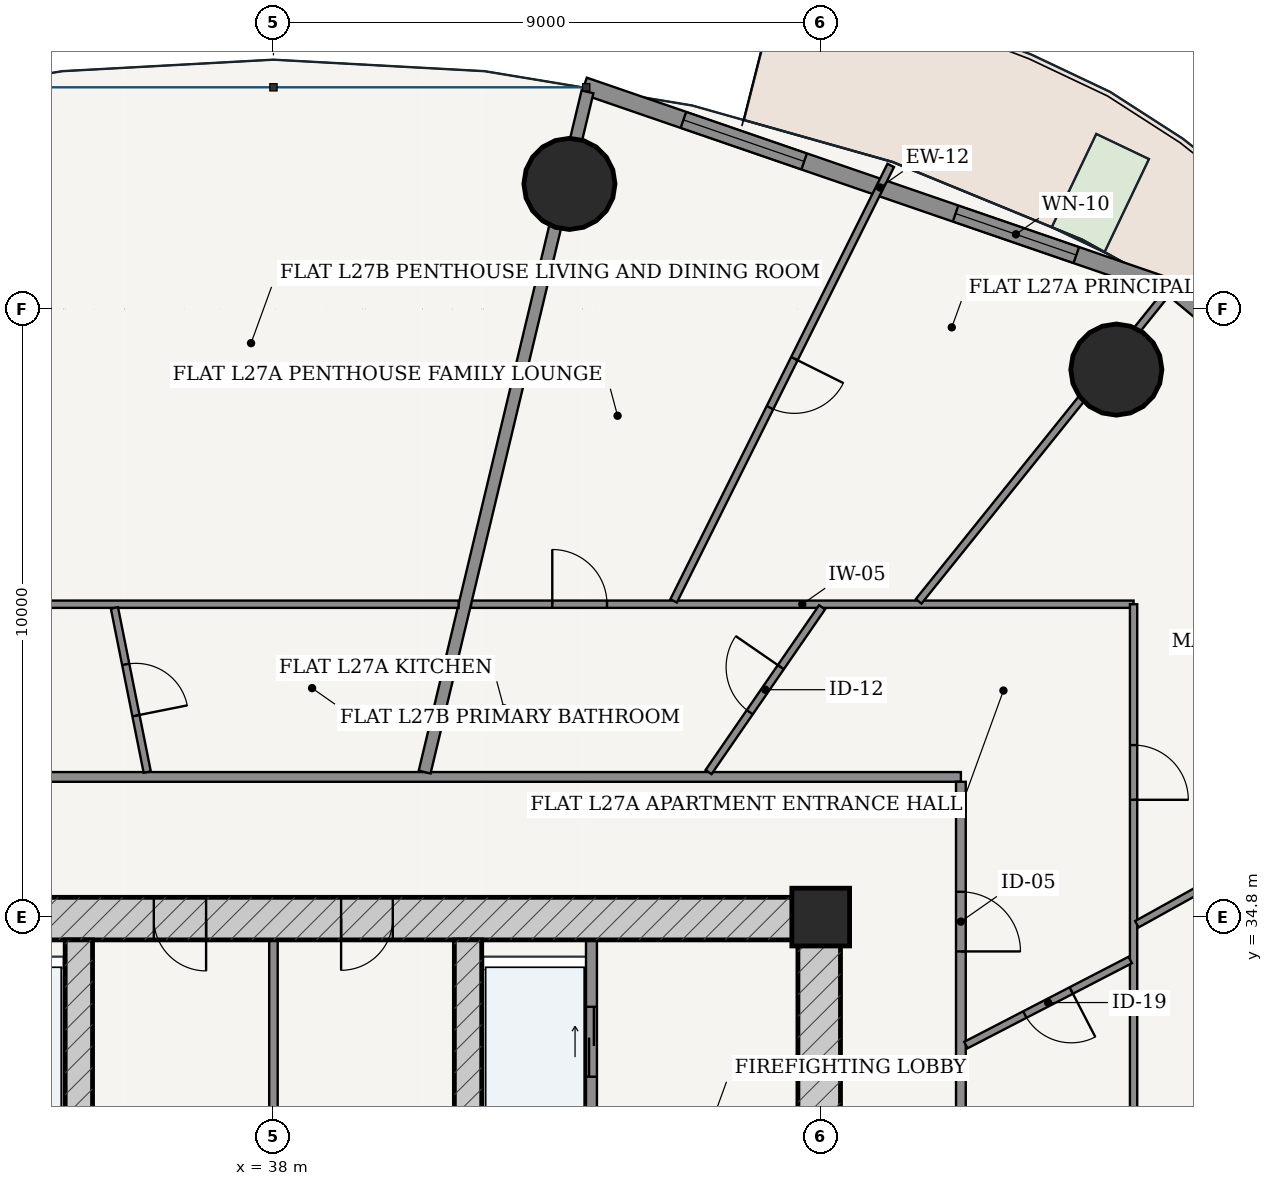
"""IFC4 building model, lengths in metres.
Left out: names, types, materials, properties, quantities, classifications, styles, units other than length and angle.
Written with IfcOpenShell. Run it as: python <this file> out.ifc"""

import sys

from ifc_helpers import new_model, si_unit, direction, frame, frame_2d, origin, origin_2d, place, context, subcontext, project, spatial, rectangle, hollow_circle, extrude, source, transform, mapped, element, fill, save


model = new_model("IFC4")
c1 = context("Model", 3, precision=1e-05, world=origin(), true_north=direction((-0.2419218956, 0.970295726276)))
c2 = subcontext(c1, "Body", "Model", "MODEL_VIEW")
j1 = project(units=[si_unit("LENGTHUNIT", "METRE"), si_unit("PLANEANGLEUNIT", "RADIAN")], contexts=[c1])
p1 = place(None, origin())
s1 = spatial("IfcSite", under=j1, at=p1, CompositionType="ELEMENT")
p2 = place(p1, origin())
s2 = spatial("IfcBuilding", under=s1, at=p2, CompositionType="ELEMENT")
p3 = place(p2, frame((0.0, 0.0, 105.0)))
s3 = spatial("IfcBuildingStorey", under=s2, at=p3, CompositionType="ELEMENT", Elevation=105.0)
p4 = place(p3, frame((47.0, 34.8, 0.0), z_axis=(0.0, 0.0, 1.0), x_axis=(1.0, 0.0, 0.0)))
e1 = element("IfcColumn", 1, at=p4, inside=s3, PredefinedType="COLUMN", context=c2, shape_type="SweptSolid", body=[
    extrude(rectangle(XDim=0.95, YDim=0.95, at=origin_2d()), origin(), (0.0, 0.0, 1.0), 3.6),
])
p5 = place(p3, frame((28.675, 34.775, 0.0), z_axis=(0.0, 0.0, 1.0), x_axis=(1.0, 0.0, 0.0)))
e2 = element("IfcWall", 2, at=p5, inside=s3, PredefinedType="SHEAR", context=c2, shape_type="SweptSolid", body=[
    extrude(rectangle(XDim=18.65, YDim=0.7, at=frame_2d((9.325, 0.0))), origin(), (0.0, 0.0, 1.0), 3.325),
])
p6 = place(p5, frame((7.357, 0.0, 0.0)))
e3 = element("IfcOpeningElement", 3, at=p6, cuts=e2, PredefinedType="OPENING", context=c2, shape_type="SweptSolid", body=[
    extrude(rectangle(XDim=0.86, YDim=2.1, at=frame_2d((0.43, 1.05))), frame((0.0, 0.36, 0.0), z_axis=(0.0, -1.0, 0.0), x_axis=(1.0, 0.0, 0.0)), (0.0, 0.0, 1.0), 0.72),
])
p7 = place(p5, frame((10.438, 0.0, 0.0)))
e4 = element("IfcOpeningElement", 4, at=p7, cuts=e2, PredefinedType="OPENING", context=c2, shape_type="SweptSolid", body=[
    extrude(rectangle(XDim=0.85, YDim=2.1, at=frame_2d((0.425, 1.05))), frame((0.0, 0.36, 0.0), z_axis=(0.0, -1.0, 0.0), x_axis=(1.0, 0.0, 0.0)), (0.0, 0.0, 1.0), 0.72),
])
p8 = place(p3, frame((46.975, 19.175, 0.0), z_axis=(0.0, 0.0, 1.0), x_axis=(0.0, 1.0, 0.0)))
e5 = element("IfcWall", 5, at=p8, inside=s3, PredefinedType="SHEAR", context=c2, shape_type="SweptSolid", body=[
    extrude(rectangle(XDim=15.25, YDim=0.7, at=frame_2d((7.625, 0.0))), origin(), (0.0, 0.0, 1.0), 3.325),
])
p9 = place(p8, frame((9.875, 0.0, 0.0)))
e6 = element("IfcOpeningElement", 6, at=p9, cuts=e5, PredefinedType="OPENING", context=c2, shape_type="SweptSolid", body=[
    extrude(rectangle(XDim=1.5, YDim=2.2, at=frame_2d((0.75, 1.1))), frame((0.0, 0.36, 0.0), z_axis=(0.0, -1.0, 0.0), x_axis=(1.0, 0.0, 0.0)), (0.0, 0.0, 1.0), 0.72),
])
p10 = place(p3, frame((34.8, 19.175, 0.0), z_axis=(0.0, 0.0, 1.0), x_axis=(0.0, 1.0, 0.0)))
e7 = element("IfcWall", 7, at=p10, inside=s3, PredefinedType="SHEAR", context=c2, shape_type="SweptSolid", body=[
    extrude(rectangle(XDim=15.25, YDim=0.45, at=frame_2d((7.625, 0.0))), origin(), (0.0, 0.0, 1.0), 3.325),
])
p11 = place(p10, frame((7.8, 0.0, 0.0)))
e8 = element("IfcOpeningElement", 8, at=p11, cuts=e7, PredefinedType="OPENING", context=c2, shape_type="SweptSolid", body=[
    extrude(rectangle(XDim=1.05, YDim=2.15, at=frame_2d((0.525, 1.075))), frame((0.0, 0.235, 0.0), z_axis=(0.0, -1.0, 0.0), x_axis=(1.0, 0.0, 0.0)), (0.0, 0.0, 1.0), 0.47),
])
p12 = place(p3, frame((41.2, 19.175, 0.0), z_axis=(0.0, 0.0, 1.0), x_axis=(0.0, 1.0, 0.0)))
e9 = element("IfcWall", 9, at=p12, inside=s3, PredefinedType="SHEAR", context=c2, shape_type="SweptSolid", body=[
    extrude(rectangle(XDim=15.25, YDim=0.45, at=frame_2d((7.625, 0.0))), origin(), (0.0, 0.0, 1.0), 3.325),
])
p13 = place(p12, frame((7.8, 0.0, 0.0)))
e10 = element("IfcOpeningElement", 10, at=p13, cuts=e9, PredefinedType="OPENING", context=c2, shape_type="SweptSolid", body=[
    extrude(rectangle(XDim=1.05, YDim=2.15, at=frame_2d((0.525, 1.075))), frame((0.0, 0.235, 0.0), z_axis=(0.0, -1.0, 0.0), x_axis=(1.0, 0.0, 0.0)), (0.0, 0.0, 1.0), 0.47),
])
for number, where, z_axis, x_axis in (
    (11, (51.862, 43.803, 0.0), (0.0, 0.0, 1.0), (1.0, 0.0, 0.0)),
    (12, (42.867, 46.857, 0.0), (0.0, 0.0, 1.0), (1.0, 0.0, 0.0)),
):
    element("IfcColumn", number, at=place(p3, frame(where, z_axis=z_axis, x_axis=x_axis)), inside=s3, PredefinedType="COLUMN", context=c2, shape_type="SweptSolid", body=[
        extrude(hollow_circle(Radius=0.75, WallThickness=0.045, at=origin_2d()), origin(), (0.0, 0.0, 1.0), 3.6),
    ])
p14 = place(p3, frame((60.154, 39.01, 0.0), z_axis=(0.0, 0.0, 1.0), x_axis=(-0.769242574941, 0.638956853706, 0.0)))
e13 = element("IfcWall", 13, at=p14, inside=s3, PredefinedType="SOLIDWALL", context=c2, shape_type="SweptSolid", body=[
    extrude(rectangle(XDim=9.69, YDim=0.26, at=frame_2d((4.845, 0.0))), origin(), (0.0, 0.0, 1.0), 3.325),
])
p15 = place(p14, frame((4.17, 0.0, 0.0)))
e14 = element("IfcOpeningElement", 14, at=p15, cuts=e13, PredefinedType="OPENING", context=c2, shape_type="SweptSolid", body=[
    extrude(rectangle(XDim=1.35, YDim=2.2, at=frame_2d((0.675, 1.1))), frame((0.0, 0.14, 0.0), z_axis=(0.0, -1.0, 0.0), x_axis=(1.0, 0.0, 0.0)), (0.0, 0.0, 1.0), 0.28),
])
p16 = place(p3, frame((52.837, 45.125, 0.0), z_axis=(0.0, 0.0, 1.0), x_axis=(-0.945597432299, 0.325339047809, 0.0)))
e15 = element("IfcWall", 15, at=p16, inside=s3, PredefinedType="SOLIDWALL", context=c2, shape_type="SweptSolid", body=[
    extrude(rectangle(XDim=10.289, YDim=0.28, at=frame_2d((5.145, 0.0))), origin(), (0.0, 0.0, 1.0), 3.325),
])
p17 = place(p16, frame((1.728, 0.0, 0.85)))
e16 = element("IfcOpeningElement", 16, at=p17, cuts=e15, PredefinedType="OPENING", context=c2, shape_type="SweptSolid", body=[
    extrude(rectangle(XDim=2.1, YDim=1.95, at=frame_2d((1.05, 0.975))), frame((0.0, 0.15, 0.0), z_axis=(0.0, -1.0, 0.0), x_axis=(1.0, 0.0, 0.0)), (0.0, 0.0, 1.0), 0.3),
])
p18 = place(p16, frame((6.461, 0.0, 0.85)))
e17 = element("IfcOpeningElement", 17, at=p18, cuts=e15, PredefinedType="OPENING", context=c2, shape_type="SweptSolid", body=[
    extrude(rectangle(XDim=2.1, YDim=1.95, at=frame_2d((1.05, 0.975))), frame((0.0, 0.15, 0.0), z_axis=(0.0, -1.0, 0.0), x_axis=(1.0, 0.0, 0.0)), (0.0, 0.0, 1.0), 0.3),
])
p19 = place(p3, frame((43.23, 28.52, 0.0), z_axis=(0.0, 0.0, 1.0), x_axis=(0.0, 1.0, 0.0)))
e18 = element("IfcWall", 18, at=p19, inside=s3, PredefinedType="PARTITIONING", context=c2, shape_type="SweptSolid", body=[
    extrude(rectangle(XDim=5.905, YDim=0.18, at=frame_2d((2.953, 0.0))), origin(), (0.0, 0.0, 1.0), 3.325),
])
p20 = place(p19, frame((0.905, 0.0, 0.0)))
e19 = element("IfcOpeningElement", 19, at=p20, cuts=e18, PredefinedType="OPENING", context=c2, shape_type="SweptSolid", body=[
    extrude(rectangle(XDim=0.85, YDim=2.1, at=frame_2d((0.425, 1.05))), frame((0.0, 0.1, 0.0), z_axis=(0.0, -1.0, 0.0), x_axis=(1.0, 0.0, 0.0)), (0.0, 0.0, 1.0), 0.2),
])
p21 = place(p19, frame((3.655, 0.0, 0.0)))
e20 = element("IfcOpeningElement", 20, at=p21, cuts=e18, PredefinedType="OPENING", context=c2, shape_type="SweptSolid", body=[
    extrude(rectangle(XDim=1.15, YDim=2.2, at=frame_2d((0.575, 1.1))), frame((0.0, 0.1, 0.0), z_axis=(0.0, -1.0, 0.0), x_axis=(1.0, 0.0, 0.0)), (0.0, 0.0, 1.0), 0.2),
])
p22 = place(p3, frame((38.0, 31.2, 0.0), z_axis=(0.0, 0.0, 1.0), x_axis=(0.0, 1.0, 0.0)))
e21 = element("IfcWall", 21, at=p22, inside=s3, PredefinedType="PARTITIONING", context=c2, shape_type="SweptSolid", body=[
    extrude(rectangle(XDim=3.225, YDim=0.14, at=frame_2d((1.613, 0.0))), origin(), (0.0, 0.0, 1.0), 3.325),
])
p23 = place(p3, frame((26.695, 37.105, 0.0), z_axis=(0.0, 0.0, 1.0), x_axis=(1.0, 0.0, 0.0)))
e22 = element("IfcWall", 22, at=p23, inside=s3, PredefinedType="PARTITIONING", context=c2, shape_type="SweptSolid", body=[
    extrude(rectangle(XDim=22.61, YDim=0.16, at=frame_2d((11.305, 0.0))), origin(), (0.0, 0.0, 1.0), 2.767),
])
p24 = place(p23, frame((4.925, 0.0, 0.0)))
e23 = element("IfcOpeningElement", 23, at=p24, cuts=e22, PredefinedType="OPENING", context=c2, shape_type="SweptSolid", body=[
    extrude(rectangle(XDim=0.98, YDim=2.2, at=frame_2d((0.49, 1.1))), frame((0.0, 0.09, 0.0), z_axis=(0.0, -1.0, 0.0), x_axis=(1.0, 0.0, 0.0)), (0.0, 0.0, 1.0), 0.18),
])
p25 = place(p3, frame((49.305, 16.575, 0.0), z_axis=(0.0, 0.0, 1.0), x_axis=(0.0, 1.0, 0.0)))
e24 = element("IfcWall", 24, at=p25, inside=s3, PredefinedType="PARTITIONING", context=c2, shape_type="SweptSolid", body=[
    extrude(rectangle(XDim=20.45, YDim=0.16, at=frame_2d((10.225, 0.0))), origin(), (0.0, 0.0, 1.0), 2.767),
])
p26 = place(p25, frame((17.66, 0.0, 0.0)))
e25 = element("IfcOpeningElement", 25, at=p26, cuts=e24, PredefinedType="OPENING", context=c2, shape_type="SweptSolid", body=[
    extrude(rectangle(XDim=0.98, YDim=2.2, at=frame_2d((0.49, 1.1))), frame((0.0, 0.09, 0.0), z_axis=(0.0, -1.0, 0.0), x_axis=(1.0, 0.0, 0.0)), (0.0, 0.0, 1.0), 0.18),
])
p27 = place(p3, frame((41.249, 39.945, 0.0), z_axis=(0.0, 0.0, 1.0), x_axis=(1.0, 0.0, 0.0)))
e26 = element("IfcWall", 26, at=p27, inside=s3, PredefinedType="PARTITIONING", context=c2, shape_type="SweptSolid", body=[
    extrude(rectangle(XDim=10.896, YDim=0.12, at=frame_2d((5.448, 0.0))), origin(), (0.0, 0.0, 1.0), 2.767),
])
p28 = place(p27, frame((1.336, 0.0, 0.0)))
e27 = element("IfcOpeningElement", 27, at=p28, cuts=e26, PredefinedType="OPENING", context=c2, shape_type="SweptSolid", body=[
    extrude(rectangle(XDim=0.9, YDim=2.15, at=frame_2d((0.45, 1.075))), frame((0.0, 0.07, 0.0), z_axis=(0.0, -1.0, 0.0), x_axis=(1.0, 0.0, 0.0)), (0.0, 0.0, 1.0), 0.14),
])
p29 = place(p3, frame((52.145, 39.945, 0.0), z_axis=(0.0, 0.0, 1.0), x_axis=(0.0, -1.0, 0.0)))
e28 = element("IfcWall", 28, at=p29, inside=s3, PredefinedType="PARTITIONING", context=c2, shape_type="SweptSolid", body=[
    extrude(rectangle(XDim=10.705, YDim=0.12, at=frame_2d((5.353, 0.0))), origin(), (0.0, 0.0, 1.0), 2.767),
])
p30 = place(p29, frame((2.316, 0.0, 0.0)))
e29 = element("IfcOpeningElement", 29, at=p30, cuts=e28, PredefinedType="OPENING", context=c2, shape_type="SweptSolid", body=[
    extrude(rectangle(XDim=0.9, YDim=2.15, at=frame_2d((0.45, 1.075))), frame((0.0, 0.07, 0.0), z_axis=(0.0, -1.0, 0.0), x_axis=(1.0, 0.0, 0.0)), (0.0, 0.0, 1.0), 0.14),
])
p31 = place(p3, frame((52.199, 34.683, 0.0), z_axis=(0.0, 0.0, 1.0), x_axis=(0.874320827228, 0.485348422349, 0.0)))
e30 = element("IfcWall", 30, at=p31, inside=s3, PredefinedType="PARTITIONING", context=c2, shape_type="SweptSolid", body=[
    extrude(rectangle(XDim=8.94, YDim=0.12, at=frame_2d((4.47, 0.0))), origin(), (0.0, 0.0, 1.0), 2.767),
])
p32 = place(p31, frame((2.953, 0.0, 0.0)))
e31 = element("IfcOpeningElement", 31, at=p32, cuts=e30, PredefinedType="OPENING", context=c2, shape_type="SweptSolid", body=[
    extrude(rectangle(XDim=0.9, YDim=2.15, at=frame_2d((0.45, 1.075))), frame((0.0, 0.07, 0.0), z_axis=(0.0, -1.0, 0.0), x_axis=(1.0, 0.0, 0.0)), (0.0, 0.0, 1.0), 0.14),
])
p33 = place(p3, frame((48.611, 39.993, 0.0), z_axis=(0.0, 0.0, 1.0), x_axis=(0.626719700294, 0.779244773651, 0.0)))
e32 = element("IfcWall", 32, at=p33, inside=s3, PredefinedType="PARTITIONING", context=c2, shape_type="SweptSolid", body=[
    extrude(rectangle(XDim=6.537, YDim=0.12, at=frame_2d((3.269, 0.0))), origin(), (0.0, 0.0, 1.0), 2.767),
])
p34 = place(p3, frame((44.581, 40.0, 0.0), z_axis=(0.0, 0.0, 1.0), x_axis=(0.446188142997, 0.894939182877, 0.0)))
e33 = element("IfcWall", 33, at=p34, inside=s3, PredefinedType="PARTITIONING", context=c2, shape_type="SweptSolid", body=[
    extrude(rectangle(XDim=8.002, YDim=0.12, at=frame_2d((4.001, 0.0))), origin(), (0.0, 0.0, 1.0), 2.767),
])
p35 = place(p34, frame((3.551, 0.0, 0.0)))
e34 = element("IfcOpeningElement", 34, at=p35, cuts=e33, PredefinedType="OPENING", context=c2, shape_type="SweptSolid", body=[
    extrude(rectangle(XDim=0.9, YDim=2.15, at=frame_2d((0.45, 1.075))), frame((0.0, 0.07, 0.0), z_axis=(0.0, -1.0, 0.0), x_axis=(1.0, 0.0, 0.0)), (0.0, 0.0, 1.0), 0.14),
])
p36 = place(p3, frame((49.387, 32.695, 0.0), z_axis=(0.0, 0.0, 1.0), x_axis=(0.888050549489, 0.459745822767, 0.0)))
e35 = element("IfcWall", 35, at=p36, inside=s3, PredefinedType="PARTITIONING", context=c2, shape_type="SweptSolid", body=[
    extrude(rectangle(XDim=3.044, YDim=0.12, at=frame_2d((1.522, 0.0))), origin(), (0.0, 0.0, 1.0), 3.325),
])
p37 = place(p36, frame((1.092, 0.0, 0.0)))
e36 = element("IfcOpeningElement", 36, at=p37, cuts=e35, PredefinedType="OPENING", context=c2, shape_type="SweptSolid", body=[
    extrude(rectangle(XDim=0.86, YDim=2.15, at=frame_2d((0.43, 1.075))), frame((0.0, 0.07, 0.0), z_axis=(0.0, -1.0, 0.0), x_axis=(1.0, 0.0, 0.0)), (0.0, 0.0, 1.0), 0.14),
])
p38 = place(p3, frame((45.155, 37.185, 0.0), z_axis=(0.0, 0.0, 1.0), x_axis=(0.567360037454, 0.823469846382, 0.0)))
e37 = element("IfcWall", 37, at=p38, inside=s3, PredefinedType="PARTITIONING", context=c2, shape_type="SweptSolid", body=[
    extrude(rectangle(XDim=3.29, YDim=0.12, at=frame_2d((1.645, 0.0))), origin(), (0.0, 0.0, 1.0), 3.004),
])
p39 = place(p38, frame((1.195, 0.0, 0.0)))
e38 = element("IfcOpeningElement", 38, at=p39, cuts=e37, PredefinedType="OPENING", context=c2, shape_type="SweptSolid", body=[
    extrude(rectangle(XDim=0.9, YDim=2.15, at=frame_2d((0.45, 1.075))), frame((0.0, 0.07, 0.0), z_axis=(0.0, -1.0, 0.0), x_axis=(1.0, 0.0, 0.0)), (0.0, 0.0, 1.0), 0.14),
])
p40 = place(p3, frame((40.486, 37.185, 0.0), z_axis=(0.0, 0.0, 1.0), x_axis=(0.232834224261, 0.972516438942, 0.0)))
e39 = element("IfcWall", 39, at=p40, inside=s3, PredefinedType="PARTITIONING", context=c2, shape_type="SweptSolid", body=[
    extrude(rectangle(XDim=11.502, YDim=0.2, at=frame_2d((5.751, 0.0))), origin(), (0.0, 0.0, 1.0), 2.767),
])
p41 = place(p3, frame((23.855, 39.945, 0.0), z_axis=(0.0, 0.0, 1.0), x_axis=(1.0, 0.0, 0.0)))
e40 = element("IfcWall", 40, at=p41, inside=s3, PredefinedType="PARTITIONING", context=c2, shape_type="SweptSolid", body=[
    extrude(rectangle(XDim=17.19, YDim=0.12, at=frame_2d((8.595, 0.0))), origin(), (0.0, 0.0, 1.0), 2.767),
])
p42 = place(p41, frame((9.133, 0.0, 0.0)))
e41 = element("IfcOpeningElement", 41, at=p42, cuts=e40, PredefinedType="OPENING", context=c2, shape_type="SweptSolid", body=[
    extrude(rectangle(XDim=0.9, YDim=2.15, at=frame_2d((0.45, 1.075))), frame((0.0, 0.07, 0.0), z_axis=(0.0, -1.0, 0.0), x_axis=(1.0, 0.0, 0.0)), (0.0, 0.0, 1.0), 0.14),
])
p43 = place(p3, frame((35.925, 37.185, 0.0), z_axis=(0.0, 0.0, 1.0), x_axis=(-0.196013794811, 0.980601138202, 0.0)))
e42 = element("IfcWall", 42, at=p43, inside=s3, PredefinedType="PARTITIONING", context=c2, shape_type="SweptSolid", body=[
    extrude(rectangle(XDim=2.753, YDim=0.12, at=frame_2d((1.376, 0.0))), origin(), (0.0, 0.0, 1.0), 3.325),
])
p44 = place(p43, frame((0.946, 0.0, 0.0)))
e43 = element("IfcOpeningElement", 43, at=p44, cuts=e42, PredefinedType="OPENING", context=c2, shape_type="SweptSolid", body=[
    extrude(rectangle(XDim=0.86, YDim=2.15, at=frame_2d((0.43, 1.075))), frame((0.0, 0.07, 0.0), z_axis=(0.0, -1.0, 0.0), x_axis=(1.0, 0.0, 0.0)), (0.0, 0.0, 1.0), 0.14),
])
m1 = source(origin(), c2, "Body", "SweptSolid", [
    extrude(rectangle(XDim=2.1, YDim=1.95, at=frame_2d((1.05, 0.975))), frame((0.0, 0.03, 0.0), z_axis=(0.0, -1.0, 0.0), x_axis=(1.0, 0.0, 0.0)), (0.0, 0.0, 1.0), 0.06),
])
p45 = place(p17, origin())
e44 = element("IfcWindow", 44, at=p45, inside=s3, PartitioningType="SINGLE_PANEL", PredefinedType="WINDOW", context=c2, shape_type="MappedRepresentation", body=[
    mapped(m1, transform((0.0, 0.0, 0.0), scale=1.0)),
])
fill(e16, e44)
p46 = place(p18, origin())
e45 = element("IfcWindow", 45, at=p46, inside=s3, PartitioningType="SINGLE_PANEL", PredefinedType="WINDOW", context=c2, shape_type="MappedRepresentation", body=[
    mapped(m1, transform((0.0, 0.0, 0.0), scale=1.0)),
])
fill(e17, e45)
m2 = source(origin(), c2, "Body", "SweptSolid", [
    extrude(rectangle(XDim=0.86, YDim=2.1, at=frame_2d((0.43, 1.05))), frame((0.0, 0.025, 0.0), z_axis=(0.0, -1.0, 0.0), x_axis=(1.0, 0.0, 0.0)), (0.0, 0.0, 1.0), 0.05),
])
p47 = place(p6, frame((0.86, 0.0, 0.0), z_axis=(0.0, 0.0, 1.0), x_axis=(-1.0, 0.0, 0.0)))
e46 = element("IfcDoor", 46, at=p47, inside=s3, OperationType="SINGLE_SWING_LEFT", PredefinedType="DOOR", context=c2, shape_type="MappedRepresentation", body=[
    mapped(m2, transform((0.0, 0.0, 0.0), scale=1.0)),
])
fill(e3, e46)
m3 = source(origin(), c2, "Body", "SweptSolid", [
    extrude(rectangle(XDim=0.85, YDim=2.1, at=frame_2d((0.425, 1.05))), frame((0.0, 0.025, 0.0), z_axis=(0.0, -1.0, 0.0), x_axis=(1.0, 0.0, 0.0)), (0.0, 0.0, 1.0), 0.05),
])
p48 = place(p7, frame((0.85, 0.0, 0.0), z_axis=(0.0, 0.0, 1.0), x_axis=(-1.0, 0.0, 0.0)))
e47 = element("IfcDoor", 47, at=p48, inside=s3, OperationType="SINGLE_SWING_RIGHT", PredefinedType="DOOR", context=c2, shape_type="MappedRepresentation", body=[
    mapped(m3, transform((0.0, 0.0, 0.0), scale=1.0)),
])
fill(e4, e47)
m4 = source(origin(), c2, "Body", "SweptSolid", [
    extrude(rectangle(XDim=1.15, YDim=2.2, at=frame_2d((0.575, 1.1))), frame((0.0, 0.025, 0.0), z_axis=(0.0, -1.0, 0.0), x_axis=(1.0, 0.0, 0.0)), (0.0, 0.0, 1.0), 0.05),
])
p49 = place(p21, origin())
e48 = element("IfcDoor", 48, at=p49, inside=s3, OperationType="DOUBLE_DOOR_SLIDING", PredefinedType="DOOR", context=c2, shape_type="MappedRepresentation", body=[
    mapped(m4, transform((0.0, 0.0, 0.0), scale=1.0)),
])
fill(e20, e48)
m5 = source(origin(), c2, "Body", "SweptSolid", [
    extrude(rectangle(XDim=0.98, YDim=2.2, at=frame_2d((0.49, 1.1))), frame((0.0, 0.025, 0.0), z_axis=(0.0, -1.0, 0.0), x_axis=(1.0, 0.0, 0.0)), (0.0, 0.0, 1.0), 0.05),
])
p50 = place(p26, frame((0.98, 0.0, 0.0), z_axis=(0.0, 0.0, 1.0), x_axis=(-1.0, 0.0, 0.0)))
e49 = element("IfcDoor", 49, at=p50, inside=s3, OperationType="SINGLE_SWING_RIGHT", PredefinedType="DOOR", context=c2, shape_type="MappedRepresentation", body=[
    mapped(m5, transform((0.0, 0.0, 0.0), scale=1.0)),
])
fill(e25, e49)
m6 = source(origin(), c2, "Body", "SweptSolid", [
    extrude(rectangle(XDim=0.86, YDim=2.15, at=frame_2d((0.43, 1.075))), frame((0.0, 0.025, 0.0), z_axis=(0.0, -1.0, 0.0), x_axis=(1.0, 0.0, 0.0)), (0.0, 0.0, 1.0), 0.05),
])
p51 = place(p37, frame((0.86, 0.0, 0.0), z_axis=(0.0, 0.0, 1.0), x_axis=(-1.0, 0.0, 0.0)))
e50 = element("IfcDoor", 50, at=p51, inside=s3, OperationType="SINGLE_SWING_LEFT", PredefinedType="DOOR", context=c2, shape_type="MappedRepresentation", body=[
    mapped(m6, transform((0.0, 0.0, 0.0), scale=1.0)),
])
fill(e36, e50)
m7 = source(origin(), c2, "Body", "SweptSolid", [
    extrude(rectangle(XDim=0.9, YDim=2.15, at=frame_2d((0.45, 1.075))), frame((0.0, 0.025, 0.0), z_axis=(0.0, -1.0, 0.0), x_axis=(1.0, 0.0, 0.0)), (0.0, 0.0, 1.0), 0.05),
])
p52 = place(p39, origin())
e51 = element("IfcDoor", 51, at=p52, inside=s3, OperationType="SINGLE_SWING_RIGHT", PredefinedType="DOOR", context=c2, shape_type="MappedRepresentation", body=[
    mapped(m7, transform((0.0, 0.0, 0.0), scale=1.0)),
])
fill(e38, e51)
p53 = place(p28, origin())
e52 = element("IfcDoor", 52, at=p53, inside=s3, OperationType="SINGLE_SWING_LEFT", PredefinedType="DOOR", context=c2, shape_type="MappedRepresentation", body=[
    mapped(m7, transform((0.0, 0.0, 0.0), scale=1.0)),
])
fill(e27, e52)
p54 = place(p30, origin())
e53 = element("IfcDoor", 53, at=p54, inside=s3, OperationType="SINGLE_SWING_RIGHT", PredefinedType="DOOR", context=c2, shape_type="MappedRepresentation", body=[
    mapped(m7, transform((0.0, 0.0, 0.0), scale=1.0)),
])
fill(e29, e53)
p55 = place(p35, frame((0.9, 0.0, 0.0), z_axis=(0.0, 0.0, 1.0), x_axis=(-1.0, 0.0, 0.0)))
e54 = element("IfcDoor", 54, at=p55, inside=s3, OperationType="SINGLE_SWING_LEFT", PredefinedType="DOOR", context=c2, shape_type="MappedRepresentation", body=[
    mapped(m7, transform((0.0, 0.0, 0.0), scale=1.0)),
])
fill(e34, e54)
p56 = place(p44, frame((0.86, 0.0, 0.0), z_axis=(0.0, 0.0, 1.0), x_axis=(-1.0, 0.0, 0.0)))
e55 = element("IfcDoor", 55, at=p56, inside=s3, OperationType="SINGLE_SWING_RIGHT", PredefinedType="DOOR", context=c2, shape_type="MappedRepresentation", body=[
    mapped(m6, transform((0.0, 0.0, 0.0), scale=1.0)),
])
fill(e43, e55)
save(model, sys.argv[1])
